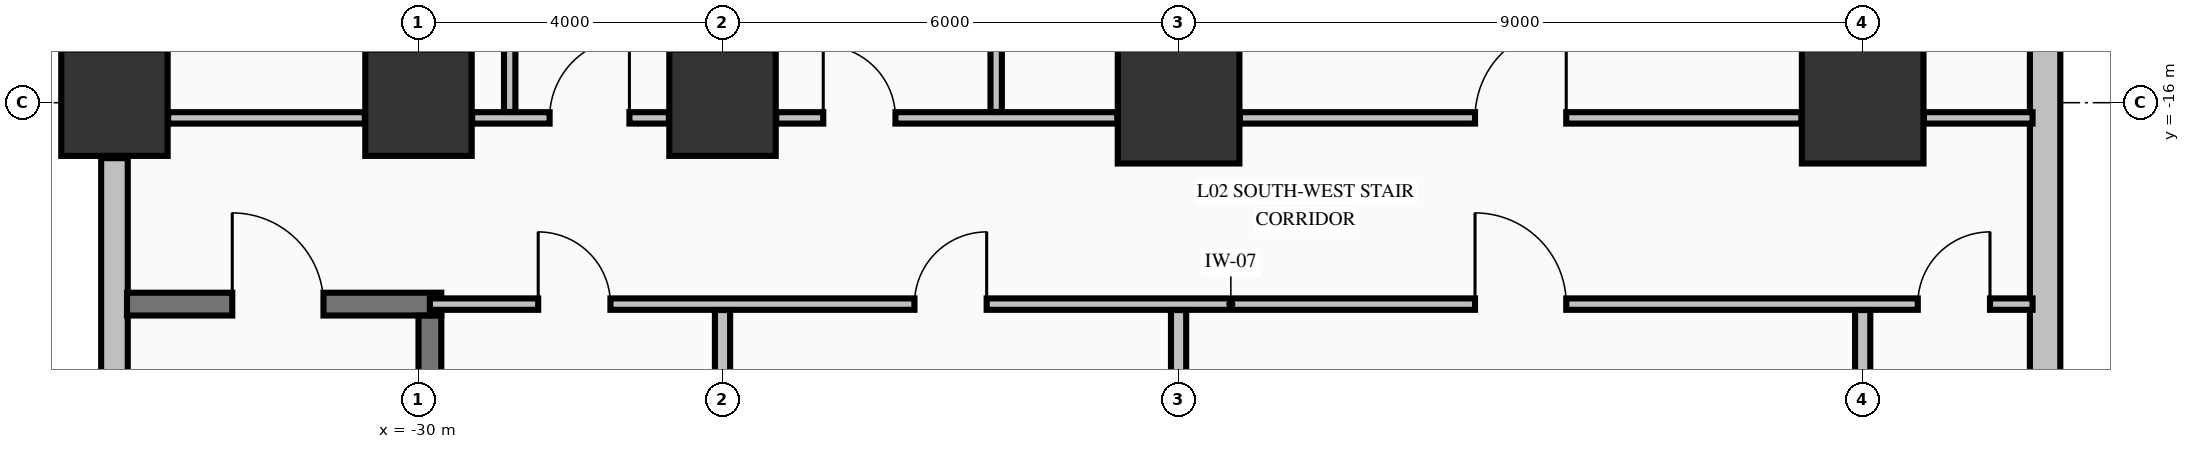
"""IFC4 building model, lengths in metres.
Left out: names, types, materials, properties, quantities, classifications, styles, units other than length and angle.
Written with IfcOpenShell. Run it as: python <this file> out.ifc"""

import sys

from ifc_helpers import new_model, si_unit, direction, frame, frame_2d, origin, origin_2d, place, context, subcontext, project, spatial, rectangle, extrude, element, fill, save


model = new_model("IFC4")
c1 = context("Model", 3, precision=1e-05, world=origin(), true_north=direction((0.0, 1.0)))
c2 = subcontext(c1, "Body", "Model", "MODEL_VIEW")
j1 = project(units=[si_unit("LENGTHUNIT", "METRE"), si_unit("PLANEANGLEUNIT", "RADIAN")], contexts=[c1])
p1 = place(None, origin())
s1 = spatial("IfcSite", under=j1, at=p1, CompositionType="ELEMENT")
p2 = place(p1, origin())
s2 = spatial("IfcBuilding", under=s1, at=p2, CompositionType="ELEMENT")
p3 = place(p2, frame((0.0, 0.0, 10.88)))
s3 = spatial("IfcBuildingStorey", under=s2, at=p3, CompositionType="ELEMENT", Elevation=10.88)
for number, where, z_axis, x_axis in (
    (1, (-34.0, -16.0, 0.0), (0.0, 0.0, 1.0), (1.0, 0.0, 0.0)),
    (2, (-30.0, -16.0, 0.0), (0.0, 0.0, 1.0), (1.0, 0.0, 0.0)),
    (3, (-26.0, -16.0, 0.0), (0.0, 0.0, 1.0), (1.0, 0.0, 0.0)),
):
    element("IfcColumn", number, at=place(p3, frame(where, z_axis=z_axis, x_axis=x_axis)), inside=s3, PredefinedType="COLUMN", context=c2, shape_type="SweptSolid", body=[
        extrude(rectangle(XDim=1.4, YDim=1.4, at=origin_2d()), origin(), (0.0, 0.0, 1.0), 5.09),
    ])
for number, where, z_axis, x_axis in (
    (4, (-20.0, -16.0, 0.0), (0.0, 0.0, 1.0), (1.0, 0.0, 0.0)),
    (5, (-11.0, -16.0, 0.0), (0.0, 0.0, 1.0), (1.0, 0.0, 0.0)),
):
    element("IfcColumn", number, at=place(p3, frame(where, z_axis=z_axis, x_axis=x_axis)), inside=s3, PredefinedType="COLUMN", context=c2, shape_type="SweptSolid", body=[
        extrude(rectangle(XDim=1.6, YDim=1.6, at=origin_2d()), origin(), (0.0, 0.0, 1.0), 5.09),
    ])
p4 = place(p3, frame((-34.0, -21.27, 0.0), z_axis=(0.0, 0.0, 1.0), x_axis=(0.0, 1.0, 0.0)))
e6 = element("IfcWall", 6, at=p4, inside=s3, PredefinedType="STANDARD", context=c2, shape_type="SweptSolid", body=[
    extrude(rectangle(XDim=4.54, YDim=0.35, at=frame_2d((2.27, 0.0))), origin(), (0.0, 0.0, 1.0), 5.09),
])
p5 = place(p3, frame((-8.6, -25.37, 0.0), z_axis=(0.0, 0.0, 1.0), x_axis=(0.0, 1.0, 0.0)))
e7 = element("IfcWall", 7, at=p5, inside=s3, PredefinedType="STANDARD", context=c2, shape_type="SweptSolid", body=[
    extrude(rectangle(XDim=24.72, YDim=0.4, at=frame_2d((12.36, 0.0))), origin(), (0.0, 0.0, 1.0), 4.132),
])
p6 = place(p3, frame((-33.835, -18.65, 0.0), z_axis=(0.0, 0.0, 1.0), x_axis=(1.0, 0.0, 0.0)))
e8 = element("IfcWall", 8, at=p6, inside=s3, PredefinedType="SHEAR", context=c2, shape_type="SweptSolid", body=[
    extrude(rectangle(XDim=4.135, YDim=0.3, at=frame_2d((2.067, 0.0))), origin(), (0.0, 0.0, 1.0), 5.09),
])
p7 = place(p6, frame((1.385, 0.0, 0.0)))
e9 = element("IfcOpeningElement", 9, at=p7, cuts=e8, PredefinedType="OPENING", context=c2, shape_type="SweptSolid", body=[
    extrude(rectangle(XDim=1.2, YDim=2.15, at=frame_2d((0.6, 1.075))), frame((0.0, 0.16, 0.0), z_axis=(0.0, -1.0, 0.0), x_axis=(1.0, 0.0, 0.0)), (0.0, 0.0, 1.0), 0.32),
])
p8 = place(p3, frame((-29.85, -18.65, 0.0), z_axis=(0.0, 0.0, 1.0), x_axis=(1.0, 0.0, 0.0)))
e10 = element("IfcWall", 10, at=p8, inside=s3, PredefinedType="PARTITIONING", context=c2, shape_type="SweptSolid", body=[
    extrude(rectangle(XDim=21.085, YDim=0.15, at=frame_2d((10.542, 0.0))), origin(), (0.0, 0.0, 1.0), 5.09),
])
p9 = place(p8, frame((1.425, 0.0, 0.0)))
e11 = element("IfcOpeningElement", 11, at=p9, cuts=e10, PredefinedType="OPENING", context=c2, shape_type="SweptSolid", body=[
    extrude(rectangle(XDim=0.95, YDim=2.15, at=frame_2d((0.475, 1.075))), frame((0.0, 0.085, 0.0), z_axis=(0.0, -1.0, 0.0), x_axis=(1.0, 0.0, 0.0)), (0.0, 0.0, 1.0), 0.17),
])
p10 = place(p8, frame((6.375, 0.0, 0.0)))
e12 = element("IfcOpeningElement", 12, at=p10, cuts=e10, PredefinedType="OPENING", context=c2, shape_type="SweptSolid", body=[
    extrude(rectangle(XDim=0.95, YDim=2.15, at=frame_2d((0.475, 1.075))), frame((0.0, 0.085, 0.0), z_axis=(0.0, -1.0, 0.0), x_axis=(1.0, 0.0, 0.0)), (0.0, 0.0, 1.0), 0.17),
])
p11 = place(p8, frame((13.75, 0.0, 0.0)))
e13 = element("IfcOpeningElement", 13, at=p11, cuts=e10, PredefinedType="OPENING", context=c2, shape_type="SweptSolid", body=[
    extrude(rectangle(XDim=1.2, YDim=2.15, at=frame_2d((0.6, 1.075))), frame((0.0, 0.085, 0.0), z_axis=(0.0, -1.0, 0.0), x_axis=(1.0, 0.0, 0.0)), (0.0, 0.0, 1.0), 0.17),
])
p12 = place(p8, frame((19.575, 0.0, 0.0)))
e14 = element("IfcOpeningElement", 14, at=p12, cuts=e10, PredefinedType="OPENING", context=c2, shape_type="SweptSolid", body=[
    extrude(rectangle(XDim=0.95, YDim=2.15, at=frame_2d((0.475, 1.075))), frame((0.0, 0.085, 0.0), z_axis=(0.0, -1.0, 0.0), x_axis=(1.0, 0.0, 0.0)), (0.0, 0.0, 1.0), 0.17),
])
p13 = place(p3, frame((-33.294, -16.2, 0.0), z_axis=(0.0, 0.0, 1.0), x_axis=(1.0, 0.0, 0.0)))
e15 = element("IfcWall", 15, at=p13, inside=s3, PredefinedType="PARTITIONING", context=c2, shape_type="SweptSolid", body=[
    extrude(rectangle(XDim=2.588, YDim=0.15, at=frame_2d((1.294, 0.0))), origin(), (0.0, 0.0, 1.0), 4.132),
])
p14 = place(p3, frame((-29.294, -16.2, 0.0), z_axis=(0.0, 0.0, 1.0), x_axis=(1.0, 0.0, 0.0)))
e16 = element("IfcWall", 16, at=p14, inside=s3, PredefinedType="PARTITIONING", context=c2, shape_type="SweptSolid", body=[
    extrude(rectangle(XDim=2.588, YDim=0.15, at=frame_2d((1.294, 0.0))), origin(), (0.0, 0.0, 1.0), 4.132),
])
p15 = place(p14, frame((1.019, 0.0, 0.0)))
e17 = element("IfcOpeningElement", 17, at=p15, cuts=e16, PredefinedType="OPENING", context=c2, shape_type="SweptSolid", body=[
    extrude(rectangle(XDim=1.05, YDim=2.15, at=frame_2d((0.525, 1.075))), frame((0.0, 0.085, 0.0), z_axis=(0.0, -1.0, 0.0), x_axis=(1.0, 0.0, 0.0)), (0.0, 0.0, 1.0), 0.17),
])
p16 = place(p3, frame((-25.294, -16.2, 0.0), z_axis=(0.0, 0.0, 1.0), x_axis=(1.0, 0.0, 0.0)))
e18 = element("IfcWall", 18, at=p16, inside=s3, PredefinedType="PARTITIONING", context=c2, shape_type="SweptSolid", body=[
    extrude(rectangle(XDim=4.488, YDim=0.15, at=frame_2d((2.244, 0.0))), origin(), (0.0, 0.0, 1.0), 4.132),
])
p17 = place(p16, frame((0.619, 0.0, 0.0)))
e19 = element("IfcOpeningElement", 19, at=p17, cuts=e18, PredefinedType="OPENING", context=c2, shape_type="SweptSolid", body=[
    extrude(rectangle(XDim=0.95, YDim=2.15, at=frame_2d((0.475, 1.075))), frame((0.0, 0.085, 0.0), z_axis=(0.0, -1.0, 0.0), x_axis=(1.0, 0.0, 0.0)), (0.0, 0.0, 1.0), 0.17),
])
p18 = place(p3, frame((-19.194, -16.2, 0.0), z_axis=(0.0, 0.0, 1.0), x_axis=(1.0, 0.0, 0.0)))
e20 = element("IfcWall", 20, at=p18, inside=s3, PredefinedType="PARTITIONING", context=c2, shape_type="SweptSolid", body=[
    extrude(rectangle(XDim=7.388, YDim=0.15, at=frame_2d((3.694, 0.0))), origin(), (0.0, 0.0, 1.0), 4.132),
])
p19 = place(p18, frame((3.094, 0.0, 0.0)))
e21 = element("IfcOpeningElement", 21, at=p19, cuts=e20, PredefinedType="OPENING", context=c2, shape_type="SweptSolid", body=[
    extrude(rectangle(XDim=1.2, YDim=2.15, at=frame_2d((0.6, 1.075))), frame((0.0, 0.085, 0.0), z_axis=(0.0, -1.0, 0.0), x_axis=(1.0, 0.0, 0.0)), (0.0, 0.0, 1.0), 0.17),
])
p20 = place(p3, frame((-10.194, -16.2, 0.0), z_axis=(0.0, 0.0, 1.0), x_axis=(1.0, 0.0, 0.0)))
e22 = element("IfcWall", 22, at=p20, inside=s3, PredefinedType="PARTITIONING", context=c2, shape_type="SweptSolid", body=[
    extrude(rectangle(XDim=1.429, YDim=0.15, at=frame_2d((0.715, 0.0))), origin(), (0.0, 0.0, 1.0), 5.09),
])
p21 = place(p3, frame((-29.85, -28.296, 0.0), z_axis=(0.0, 0.0, 1.0), x_axis=(0.0, 1.0, 0.0)))
e23 = element("IfcWall", 23, at=p21, inside=s3, PredefinedType="SHEAR", context=c2, shape_type="SweptSolid", body=[
    extrude(rectangle(XDim=9.494, YDim=0.3, at=frame_2d((4.747, 0.0))), origin(), (0.0, 0.0, 1.0), 5.09),
])
p22 = place(p3, frame((-28.8, -16.122, 0.0), z_axis=(0.0, 0.0, 1.0), x_axis=(0.0, 1.0, 0.0)))
e24 = element("IfcWall", 24, at=p22, inside=s3, PredefinedType="PARTITIONING", context=c2, shape_type="SweptSolid", body=[
    extrude(rectangle(XDim=7.019, YDim=0.15, at=frame_2d((3.51, 0.0))), origin(), (0.0, 0.0, 1.0), 5.09),
])
p23 = place(p22, frame((2.997, 0.0, 0.0)))
e25 = element("IfcOpeningElement", 25, at=p23, cuts=e24, PredefinedType="OPENING", context=c2, shape_type="SweptSolid", body=[
    extrude(rectangle(XDim=1.05, YDim=2.15, at=frame_2d((0.525, 1.075))), frame((0.0, 0.085, 0.0), z_axis=(0.0, -1.0, 0.0), x_axis=(1.0, 0.0, 0.0)), (0.0, 0.0, 1.0), 0.17),
])
p24 = place(p3, frame((-26.0, -21.294, 0.0), z_axis=(0.0, 0.0, 1.0), x_axis=(0.0, 1.0, 0.0)))
e26 = element("IfcWall", 26, at=p24, inside=s3, PredefinedType="PARTITIONING", context=c2, shape_type="SweptSolid", body=[
    extrude(rectangle(XDim=2.566, YDim=0.2, at=frame_2d((1.283, 0.0))), origin(), (0.0, 0.0, 1.0), 4.132),
])
p25 = place(p3, frame((-22.4, -16.122, 0.0), z_axis=(0.0, 0.0, 1.0), x_axis=(0.0, 1.0, 0.0)))
e27 = element("IfcWall", 27, at=p25, inside=s3, PredefinedType="PARTITIONING", context=c2, shape_type="SweptSolid", body=[
    extrude(rectangle(XDim=6.069, YDim=0.15, at=frame_2d((3.035, 0.0))), origin(), (0.0, 0.0, 1.0), 5.09),
])
for number, where, z_axis, x_axis in (
    (28, (-20.0, -21.194, 0.0), (0.0, 0.0, 1.0), (0.0, 1.0, 0.0)),
    (29, (-11.0, -21.194, 0.0), (0.0, 0.0, 1.0), (0.0, 1.0, 0.0)),
):
    element("IfcWall", number, at=place(p3, frame(where, z_axis=z_axis, x_axis=x_axis)), inside=s3, PredefinedType="PARTITIONING", context=c2, shape_type="SweptSolid", body=[
        extrude(rectangle(XDim=2.466, YDim=0.2, at=frame_2d((1.233, 0.0))), origin(), (0.0, 0.0, 1.0), 4.132),
    ])
p26 = place(p7, origin())
e30 = element("IfcDoor", 30, at=p26, inside=s3, OperationType="SINGLE_SWING_LEFT", PredefinedType="DOOR", context=c2, shape_type="SweptSolid", body=[
    extrude(rectangle(XDim=1.2, YDim=2.15, at=frame_2d((0.6, 1.075))), frame((0.0, 0.025, 0.0), z_axis=(0.0, -1.0, 0.0), x_axis=(1.0, 0.0, 0.0)), (0.0, 0.0, 1.0), 0.05),
])
fill(e9, e30)
p27 = place(p17, origin())
e31 = element("IfcDoor", 31, at=p27, inside=s3, OperationType="SINGLE_SWING_LEFT", PredefinedType="DOOR", context=c2, shape_type="SweptSolid", body=[
    extrude(rectangle(XDim=0.95, YDim=2.15, at=frame_2d((0.475, 1.075))), frame((0.0, 0.025, 0.0), z_axis=(0.0, -1.0, 0.0), x_axis=(1.0, 0.0, 0.0)), (0.0, 0.0, 1.0), 0.05),
])
fill(e19, e31)
p28 = place(p19, origin())
e32 = element("IfcDoor", 32, at=p28, inside=s3, OperationType="SINGLE_SWING_RIGHT", PredefinedType="DOOR", context=c2, shape_type="SweptSolid", body=[
    extrude(rectangle(XDim=1.2, YDim=2.15, at=frame_2d((0.6, 1.075))), frame((0.0, 0.025, 0.0), z_axis=(0.0, -1.0, 0.0), x_axis=(1.0, 0.0, 0.0)), (0.0, 0.0, 1.0), 0.05),
])
fill(e21, e32)
p29 = place(p15, origin())
e33 = element("IfcDoor", 33, at=p29, inside=s3, OperationType="SINGLE_SWING_RIGHT", PredefinedType="DOOR", context=c2, shape_type="SweptSolid", body=[
    extrude(rectangle(XDim=1.05, YDim=2.15, at=frame_2d((0.525, 1.075))), frame((0.0, 0.025, 0.0), z_axis=(0.0, -1.0, 0.0), x_axis=(1.0, 0.0, 0.0)), (0.0, 0.0, 1.0), 0.05),
])
fill(e17, e33)
p30 = place(p9, origin())
e34 = element("IfcDoor", 34, at=p30, inside=s3, OperationType="SINGLE_SWING_LEFT", PredefinedType="DOOR", context=c2, shape_type="SweptSolid", body=[
    extrude(rectangle(XDim=0.95, YDim=2.15, at=frame_2d((0.475, 1.075))), frame((0.0, 0.025, 0.0), z_axis=(0.0, -1.0, 0.0), x_axis=(1.0, 0.0, 0.0)), (0.0, 0.0, 1.0), 0.05),
])
fill(e11, e34)
p31 = place(p10, origin())
e35 = element("IfcDoor", 35, at=p31, inside=s3, OperationType="SINGLE_SWING_RIGHT", PredefinedType="DOOR", context=c2, shape_type="SweptSolid", body=[
    extrude(rectangle(XDim=0.95, YDim=2.15, at=frame_2d((0.475, 1.075))), frame((0.0, 0.025, 0.0), z_axis=(0.0, -1.0, 0.0), x_axis=(1.0, 0.0, 0.0)), (0.0, 0.0, 1.0), 0.05),
])
fill(e12, e35)
p32 = place(p11, origin())
e36 = element("IfcDoor", 36, at=p32, inside=s3, OperationType="SINGLE_SWING_LEFT", PredefinedType="DOOR", context=c2, shape_type="SweptSolid", body=[
    extrude(rectangle(XDim=1.2, YDim=2.15, at=frame_2d((0.6, 1.075))), frame((0.0, 0.025, 0.0), z_axis=(0.0, -1.0, 0.0), x_axis=(1.0, 0.0, 0.0)), (0.0, 0.0, 1.0), 0.05),
])
fill(e13, e36)
p33 = place(p12, origin())
e37 = element("IfcDoor", 37, at=p33, inside=s3, OperationType="SINGLE_SWING_RIGHT", PredefinedType="DOOR", context=c2, shape_type="SweptSolid", body=[
    extrude(rectangle(XDim=0.95, YDim=2.15, at=frame_2d((0.475, 1.075))), frame((0.0, 0.025, 0.0), z_axis=(0.0, -1.0, 0.0), x_axis=(1.0, 0.0, 0.0)), (0.0, 0.0, 1.0), 0.05),
])
fill(e14, e37)
save(model, sys.argv[1])
